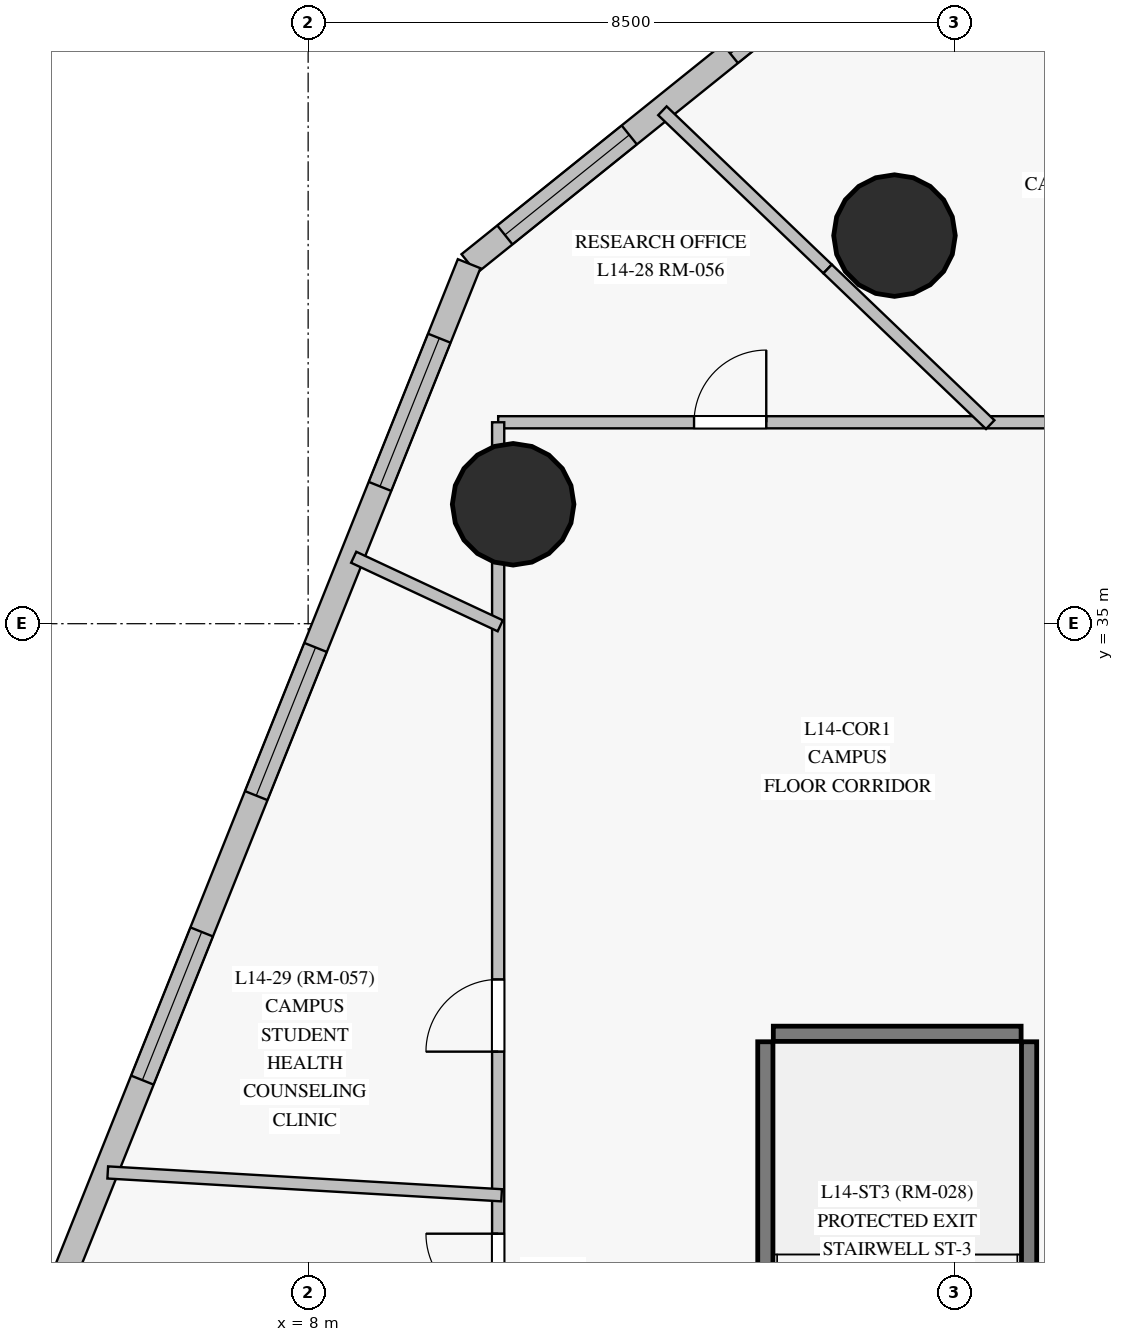
"""IFC4 building model, lengths in metres.
Left out: names, types, materials, properties, quantities, classifications, styles, units other than length and angle.
Written with IfcOpenShell. Run it as: python <this file> out.ifc"""

import sys

from ifc_helpers import new_model, si_unit, direction, frame, frame_2d, origin, origin_with_axes, origin_2d, place, context, subcontext, project, spatial, rectangle, circle, extrude, source, transform, mapped, element, fill, save


model = new_model("IFC4")
c1 = context("Model", 3, precision=1e-05, world=origin(), true_north=direction((0.0, 1.0)))
c2 = subcontext(c1, "Body", "Model", "MODEL_VIEW")
j1 = project(units=[si_unit("LENGTHUNIT", "METRE"), si_unit("PLANEANGLEUNIT", "RADIAN")], contexts=[c1])
p1 = place(None, origin())
s1 = spatial("IfcSite", under=j1, at=p1, CompositionType="ELEMENT")
p2 = place(p1, origin())
s2 = spatial("IfcBuilding", under=s1, at=p2, CompositionType="ELEMENT")
p3 = place(p2, frame((0.0, 0.0, 55.3)))
s3 = spatial("IfcBuildingStorey", under=s2, at=p3, CompositionType="ELEMENT", Elevation=55.3)
m1 = source(origin_with_axes(), c2, "Body", "SweptSolid", [
    extrude(circle(Radius=0.8, at=origin_2d()), origin(), (0.0, 0.0, 1.0), 3.6),
])
for number, where, z_axis, x_axis in (
    (1, (15.714, 40.106, 0.0), (0.0, 0.0, 1.0), (1.0, 0.0, 0.0)),
    (2, (10.697, 36.571, 0.0), (0.0, 0.0, 1.0), (1.0, 0.0, 0.0)),
):
    element("IfcColumn", number, at=place(p3, frame(where, z_axis=z_axis, x_axis=x_axis)), inside=s3, PredefinedType="COLUMN", context=c2, shape_type="MappedRepresentation", body=[
        mapped(m1, transform((0.0, 0.0, 0.0), scale=1.0)),
    ])
p4 = place(p3, frame((19.52, 47.296, 0.0), z_axis=(0.0, 0.0, 1.0), x_axis=(-0.779334397084, -0.626608248846, 0.0)))
e3 = element("IfcWall", 3, at=p4, inside=s3, PredefinedType="SOLIDWALL", context=c2, shape_type="SweptSolid", body=[
    extrude(rectangle(XDim=12.064, YDim=0.32, at=frame_2d((6.032, 0.0))), origin(), (0.0, 0.0, 1.0), 3.35),
])
p5 = place(p4, frame((1.768, 0.0, 0.85)))
e4 = element("IfcOpeningElement", 4, at=p5, cuts=e3, PredefinedType="OPENING", context=c2, shape_type="SweptSolid", body=[
    extrude(rectangle(XDim=2.1, YDim=1.95, at=frame_2d((1.05, 0.975))), frame((0.0, 0.17, 0.0), z_axis=(0.0, -1.0, 0.0), x_axis=(1.0, 0.0, 0.0)), (0.0, 0.0, 1.0), 0.34),
])
p6 = place(p4, frame((5.554, 0.0, 0.85)))
e5 = element("IfcOpeningElement", 5, at=p6, cuts=e3, PredefinedType="OPENING", context=c2, shape_type="SweptSolid", body=[
    extrude(rectangle(XDim=2.1, YDim=1.95, at=frame_2d((1.05, 0.975))), frame((0.0, 0.17, 0.0), z_axis=(0.0, -1.0, 0.0), x_axis=(1.0, 0.0, 0.0)), (0.0, 0.0, 1.0), 0.34),
])
p7 = place(p4, frame((9.361, 0.0, 0.85)))
e6 = element("IfcOpeningElement", 6, at=p7, cuts=e3, PredefinedType="OPENING", context=c2, shape_type="SweptSolid", body=[
    extrude(rectangle(XDim=2.1, YDim=1.95, at=frame_2d((1.05, 0.975))), frame((0.0, 0.17, 0.0), z_axis=(0.0, -1.0, 0.0), x_axis=(1.0, 0.0, 0.0)), (0.0, 0.0, 1.0), 0.34),
])
p8 = place(p3, frame((10.118, 39.736, 0.0), z_axis=(0.0, 0.0, 1.0), x_axis=(-0.371586779143, -0.928398225745, 0.0)))
e7 = element("IfcWall", 7, at=p8, inside=s3, PredefinedType="SOLIDWALL", context=c2, shape_type="SweptSolid", body=[
    extrude(rectangle(XDim=15.025, YDim=0.32, at=frame_2d((7.512, 0.0))), origin(), (0.0, 0.0, 1.0), 3.35),
])
p9 = place(p8, frame((1.056, 0.0, 0.85)))
e8 = element("IfcOpeningElement", 8, at=p9, cuts=e7, PredefinedType="OPENING", context=c2, shape_type="SweptSolid", body=[
    extrude(rectangle(XDim=2.1, YDim=1.95, at=frame_2d((1.05, 0.975))), frame((0.0, 0.17, 0.0), z_axis=(0.0, -1.0, 0.0), x_axis=(1.0, 0.0, 0.0)), (0.0, 0.0, 1.0), 0.34),
])
p10 = place(p8, frame((5.438, 0.0, 0.85)))
e9 = element("IfcOpeningElement", 9, at=p10, cuts=e7, PredefinedType="OPENING", context=c2, shape_type="SweptSolid", body=[
    extrude(rectangle(XDim=2.1, YDim=1.95, at=frame_2d((1.05, 0.975))), frame((0.0, 0.17, 0.0), z_axis=(0.0, -1.0, 0.0), x_axis=(1.0, 0.0, 0.0)), (0.0, 0.0, 1.0), 0.34),
])
p11 = place(p8, frame((9.469, 0.0, 0.85)))
e10 = element("IfcOpeningElement", 10, at=p11, cuts=e7, PredefinedType="OPENING", context=c2, shape_type="SweptSolid", body=[
    extrude(rectangle(XDim=2.1, YDim=1.95, at=frame_2d((1.05, 0.975))), frame((0.0, 0.17, 0.0), z_axis=(0.0, -1.0, 0.0), x_axis=(1.0, 0.0, 0.0)), (0.0, 0.0, 1.0), 0.34),
])
p12 = place(p3, frame((14.015, 22.15, 0.0), z_axis=(0.0, 0.0, 1.0), x_axis=(0.0, 1.0, 0.0)))
e11 = element("IfcWall", 11, at=p12, inside=s3, PredefinedType="SHEAR", context=c2, shape_type="SweptSolid", body=[
    extrude(rectangle(XDim=7.35, YDim=0.2, at=frame_2d((3.675, 0.0))), origin(), (0.0, 0.0, 1.0), 3.35),
])
p13 = place(p3, frame((17.485, 22.15, 0.0), z_axis=(0.0, 0.0, 1.0), x_axis=(0.0, 1.0, 0.0)))
e12 = element("IfcWall", 12, at=p13, inside=s3, PredefinedType="SHEAR", context=c2, shape_type="SweptSolid", body=[
    extrude(rectangle(XDim=7.35, YDim=0.2, at=frame_2d((3.675, 0.0))), origin(), (0.0, 0.0, 1.0), 3.35),
])
p14 = place(p13, frame((0.35, 0.0, 0.0)))
e13 = element("IfcOpeningElement", 13, at=p14, cuts=e12, PredefinedType="OPENING", context=c2, shape_type="SweptSolid", body=[
    extrude(rectangle(XDim=1.15, YDim=2.15, at=frame_2d((0.575, 1.075))), frame((0.0, 0.11, 0.0), z_axis=(0.0, -1.0, 0.0), x_axis=(1.0, 0.0, 0.0)), (0.0, 0.0, 1.0), 0.22),
])
p15 = place(p3, frame((14.12, 29.605, 0.0), z_axis=(0.0, 0.0, 1.0), x_axis=(1.0, 0.0, 0.0)))
e14 = element("IfcWall", 14, at=p15, inside=s3, PredefinedType="SHEAR", context=c2, shape_type="SweptSolid", body=[
    extrude(rectangle(XDim=3.26, YDim=0.2, at=frame_2d((1.63, 0.0))), origin(), (0.0, 0.0, 1.0), 3.35),
])
p16 = place(p3, frame((10.5, 37.65, 0.0), z_axis=(0.0, 0.0, 1.0), x_axis=(1.0, 0.0, 0.0)))
e15 = element("IfcWall", 15, at=p16, inside=s3, PredefinedType="PARTITIONING", context=c2, shape_type="SweptSolid", body=[
    extrude(rectangle(XDim=29.75, YDim=0.16, at=frame_2d((14.875, 0.0))), origin(), (0.0, 0.0, 1.0), 2.75),
])
p17 = place(p16, frame((26.502, 0.0, 0.0)))
e16 = element("IfcOpeningElement", 16, at=p17, cuts=e15, PredefinedType="OPENING", context=c2, shape_type="SweptSolid", body=[
    extrude(rectangle(XDim=0.95, YDim=2.15, at=frame_2d((0.475, 1.075))), frame((0.0, 0.09, 0.0), z_axis=(0.0, -1.0, 0.0), x_axis=(1.0, 0.0, 0.0)), (0.0, 0.0, 1.0), 0.18),
])
p18 = place(p16, frame((24.014, 0.0, 0.0)))
e17 = element("IfcOpeningElement", 17, at=p18, cuts=e15, PredefinedType="OPENING", context=c2, shape_type="SweptSolid", body=[
    extrude(rectangle(XDim=0.95, YDim=2.15, at=frame_2d((0.475, 1.075))), frame((0.0, 0.09, 0.0), z_axis=(0.0, -1.0, 0.0), x_axis=(1.0, 0.0, 0.0)), (0.0, 0.0, 1.0), 0.18),
])
p19 = place(p16, frame((21.837, 0.0, 0.0)))
e18 = element("IfcOpeningElement", 18, at=p19, cuts=e15, PredefinedType="OPENING", context=c2, shape_type="SweptSolid", body=[
    extrude(rectangle(XDim=0.95, YDim=2.15, at=frame_2d((0.475, 1.075))), frame((0.0, 0.09, 0.0), z_axis=(0.0, -1.0, 0.0), x_axis=(1.0, 0.0, 0.0)), (0.0, 0.0, 1.0), 0.18),
])
p20 = place(p16, frame((18.823, 0.0, 0.0)))
e19 = element("IfcOpeningElement", 19, at=p20, cuts=e15, PredefinedType="OPENING", context=c2, shape_type="SweptSolid", body=[
    extrude(rectangle(XDim=0.95, YDim=2.15, at=frame_2d((0.475, 1.075))), frame((0.0, 0.09, 0.0), z_axis=(0.0, -1.0, 0.0), x_axis=(1.0, 0.0, 0.0)), (0.0, 0.0, 1.0), 0.18),
])
p21 = place(p16, frame((15.836, 0.0, 0.0)))
e20 = element("IfcOpeningElement", 20, at=p21, cuts=e15, PredefinedType="OPENING", context=c2, shape_type="SweptSolid", body=[
    extrude(rectangle(XDim=0.95, YDim=2.15, at=frame_2d((0.475, 1.075))), frame((0.0, 0.09, 0.0), z_axis=(0.0, -1.0, 0.0), x_axis=(1.0, 0.0, 0.0)), (0.0, 0.0, 1.0), 0.18),
])
p22 = place(p16, frame((13.96, 0.0, 0.0)))
e21 = element("IfcOpeningElement", 21, at=p22, cuts=e15, PredefinedType="OPENING", context=c2, shape_type="SweptSolid", body=[
    extrude(rectangle(XDim=0.95, YDim=2.15, at=frame_2d((0.475, 1.075))), frame((0.0, 0.09, 0.0), z_axis=(0.0, -1.0, 0.0), x_axis=(1.0, 0.0, 0.0)), (0.0, 0.0, 1.0), 0.18),
])
p23 = place(p16, frame((9.938, 0.0, 0.0)))
e22 = element("IfcOpeningElement", 22, at=p23, cuts=e15, PredefinedType="OPENING", context=c2, shape_type="SweptSolid", body=[
    extrude(rectangle(XDim=0.95, YDim=2.15, at=frame_2d((0.475, 1.075))), frame((0.0, 0.09, 0.0), z_axis=(0.0, -1.0, 0.0), x_axis=(1.0, 0.0, 0.0)), (0.0, 0.0, 1.0), 0.18),
])
p24 = place(p16, frame((2.577, 0.0, 0.0)))
e23 = element("IfcOpeningElement", 23, at=p24, cuts=e15, PredefinedType="OPENING", context=c2, shape_type="SweptSolid", body=[
    extrude(rectangle(XDim=0.95, YDim=2.15, at=frame_2d((0.475, 1.075))), frame((0.0, 0.09, 0.0), z_axis=(0.0, -1.0, 0.0), x_axis=(1.0, 0.0, 0.0)), (0.0, 0.0, 1.0), 0.18),
])
p25 = place(p3, frame((10.5, 15.35, 0.0), z_axis=(0.0, 0.0, 1.0), x_axis=(0.0, 1.0, 0.0)))
e24 = element("IfcWall", 24, at=p25, inside=s3, PredefinedType="PARTITIONING", context=c2, shape_type="SweptSolid", body=[
    extrude(rectangle(XDim=22.3, YDim=0.16, at=frame_2d((11.15, 0.0))), origin(), (0.0, 0.0, 1.0), 2.75),
])
p26 = place(p25, frame((10.675, 0.0, 0.0)))
e25 = element("IfcOpeningElement", 25, at=p26, cuts=e24, PredefinedType="OPENING", context=c2, shape_type="SweptSolid", body=[
    extrude(rectangle(XDim=0.95, YDim=2.15, at=frame_2d((0.475, 1.075))), frame((0.0, 0.09, 0.0), z_axis=(0.0, -1.0, 0.0), x_axis=(1.0, 0.0, 0.0)), (0.0, 0.0, 1.0), 0.18),
])
p27 = place(p25, frame((5.1, 0.0, 0.0)))
e26 = element("IfcOpeningElement", 26, at=p27, cuts=e24, PredefinedType="OPENING", context=c2, shape_type="SweptSolid", body=[
    extrude(rectangle(XDim=0.96, YDim=2.15, at=frame_2d((0.48, 1.075))), frame((0.0, 0.09, 0.0), z_axis=(0.0, -1.0, 0.0), x_axis=(1.0, 0.0, 0.0)), (0.0, 0.0, 1.0), 0.18),
])
p28 = place(p25, frame((14.02, 0.0, 0.0)))
e27 = element("IfcOpeningElement", 27, at=p28, cuts=e24, PredefinedType="OPENING", context=c2, shape_type="SweptSolid", body=[
    extrude(rectangle(XDim=0.95, YDim=2.15, at=frame_2d((0.475, 1.075))), frame((0.0, 0.09, 0.0), z_axis=(0.0, -1.0, 0.0), x_axis=(1.0, 0.0, 0.0)), (0.0, 0.0, 1.0), 0.18),
])
p29 = place(p3, frame((5.364, 27.781, 0.0), z_axis=(0.0, 0.0, 1.0), x_axis=(0.99832492802, -0.057856184577, 0.0)))
e28 = element("IfcWall", 28, at=p29, inside=s3, PredefinedType="PARTITIONING", context=c2, shape_type="SweptSolid", body=[
    extrude(rectangle(XDim=5.19, YDim=0.16, at=frame_2d((2.595, 0.0))), origin(), (0.0, 0.0, 1.0), 3.35),
])
p30 = place(p3, frame((14.834, 39.667, 0.0), z_axis=(0.0, 0.0, 1.0), x_axis=(-0.722317497453, 0.691561590079, 0.0)))
e29 = element("IfcWall", 29, at=p30, inside=s3, PredefinedType="PARTITIONING", context=c2, shape_type="SweptSolid", body=[
    extrude(rectangle(XDim=3.009, YDim=0.16, at=frame_2d((1.504, 0.0))), origin(), (0.0, 0.0, 1.0), 3.35),
])
p31 = place(p3, frame((16.974, 37.619, 0.0), z_axis=(0.0, 0.0, 1.0), x_axis=(-0.722274713214, 0.691606274301, 0.0)))
e30 = element("IfcWall", 30, at=p31, inside=s3, PredefinedType="PARTITIONING", context=c2, shape_type="SweptSolid", body=[
    extrude(rectangle(XDim=2.961, YDim=0.16, at=frame_2d((1.481, 0.0))), origin(), (0.0, 0.0, 1.0), 2.7),
])
p32 = place(p3, frame((10.527, 34.972, 0.0), z_axis=(0.0, 0.0, 1.0), x_axis=(-0.90579889289, 0.423707877717, 0.0)))
e31 = element("IfcWall", 31, at=p32, inside=s3, PredefinedType="PARTITIONING", context=c2, shape_type="SweptSolid", body=[
    extrude(rectangle(XDim=2.128, YDim=0.16, at=frame_2d((1.064, 0.0))), origin(), (0.0, 0.0, 1.0), 3.35),
])
m2 = source(origin_with_axes(), c2, "Body", "SweptSolid", [
    extrude(rectangle(XDim=2.1, YDim=1.95, at=frame_2d((1.05, 0.975))), frame((0.0, 0.03, 0.0), z_axis=(0.0, -1.0, 0.0), x_axis=(1.0, 0.0, 0.0)), (0.0, 0.0, 1.0), 0.06),
])
p33 = place(p6, origin())
e32 = element("IfcWindow", 32, at=p33, inside=s3, PartitioningType="SINGLE_PANEL", PredefinedType="WINDOW", context=c2, shape_type="MappedRepresentation", body=[
    mapped(m2, transform((0.0, 0.0, 0.0), scale=1.0)),
])
fill(e5, e32)
p34 = place(p7, origin())
e33 = element("IfcWindow", 33, at=p34, inside=s3, PartitioningType="SINGLE_PANEL", PredefinedType="WINDOW", context=c2, shape_type="MappedRepresentation", body=[
    mapped(m2, transform((0.0, 0.0, 0.0), scale=1.0)),
])
fill(e6, e33)
p35 = place(p9, origin())
e34 = element("IfcWindow", 34, at=p35, inside=s3, PartitioningType="SINGLE_PANEL", PredefinedType="WINDOW", context=c2, shape_type="MappedRepresentation", body=[
    mapped(m2, transform((0.0, 0.0, 0.0), scale=1.0)),
])
fill(e8, e34)
p36 = place(p10, origin())
e35 = element("IfcWindow", 35, at=p36, inside=s3, PartitioningType="SINGLE_PANEL", PredefinedType="WINDOW", context=c2, shape_type="MappedRepresentation", body=[
    mapped(m2, transform((0.0, 0.0, 0.0), scale=1.0)),
])
fill(e9, e35)
p37 = place(p11, origin())
e36 = element("IfcWindow", 36, at=p37, inside=s3, PartitioningType="SINGLE_PANEL", PredefinedType="WINDOW", context=c2, shape_type="MappedRepresentation", body=[
    mapped(m2, transform((0.0, 0.0, 0.0), scale=1.0)),
])
fill(e10, e36)
m3 = source(origin_with_axes(), c2, "Body", "SweptSolid", [
    extrude(rectangle(XDim=0.95, YDim=2.15, at=frame_2d((0.475, 1.075))), frame((0.0, 0.025, 0.0), z_axis=(0.0, -1.0, 0.0), x_axis=(1.0, 0.0, 0.0)), (0.0, 0.0, 1.0), 0.05),
])
p38 = place(p26, origin())
e37 = element("IfcDoor", 37, at=p38, inside=s3, OperationType="SINGLE_SWING_RIGHT", PredefinedType="DOOR", context=c2, shape_type="MappedRepresentation", body=[
    mapped(m3, transform((0.0, 0.0, 0.0), scale=1.0)),
])
fill(e25, e37)
p39 = place(p24, origin())
e38 = element("IfcDoor", 38, at=p39, inside=s3, OperationType="SINGLE_SWING_RIGHT", PredefinedType="DOOR", context=c2, shape_type="MappedRepresentation", body=[
    mapped(m3, transform((0.0, 0.0, 0.0), scale=1.0)),
])
fill(e23, e38)
p40 = place(p28, origin())
e39 = element("IfcDoor", 39, at=p40, inside=s3, OperationType="SINGLE_SWING_LEFT", PredefinedType="DOOR", context=c2, shape_type="MappedRepresentation", body=[
    mapped(m3, transform((0.0, 0.0, 0.0), scale=1.0)),
])
fill(e27, e39)
save(model, sys.argv[1])
